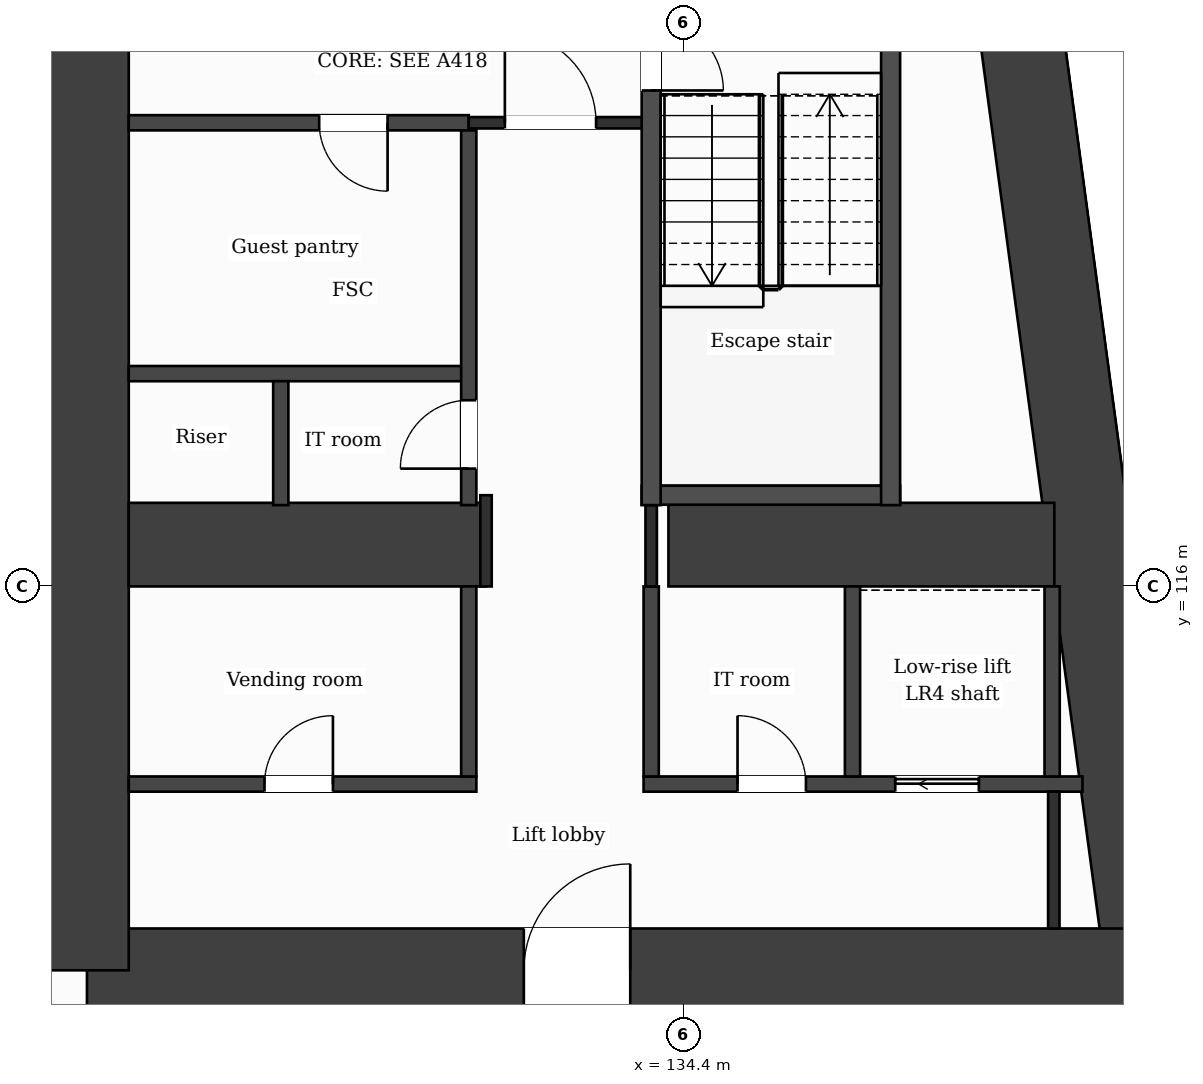
"""IFC4 building model, lengths in metres.
Left out: names, types, materials, properties, quantities, classifications, styles, units other than length and angle.
Written with IfcOpenShell. Run it as: python <this file> out.ifc"""

import sys

from ifc_helpers import new_model, si_unit, direction, frame, frame_2d, origin, place, context, subcontext, project, spatial, rectangle, extrude, element, fill, save


model = new_model("IFC4")
c1 = context("Model", 3, precision=1e-05, world=origin(), true_north=direction((0.0, 1.0)))
c2 = subcontext(c1, "Body", "Model", "MODEL_VIEW")
j1 = project(units=[si_unit("LENGTHUNIT", "METRE"), si_unit("PLANEANGLEUNIT", "RADIAN")], contexts=[c1])
p1 = place(None, origin())
s1 = spatial("IfcSite", under=j1, at=p1, CompositionType="ELEMENT")
p2 = place(p1, origin())
s2 = spatial("IfcBuilding", under=s1, at=p2, CompositionType="ELEMENT")
p3 = place(p2, frame((0.0, 0.0, 77.5)))
s3 = spatial("IfcBuildingStorey", under=s2, at=p3, CompositionType="ELEMENT", Elevation=77.5)
p4 = place(p3, frame((137.688, 131.85, 0.0), z_axis=(0.0, 0.0, 1.0), x_axis=(0.133411793472, -0.991060691059, 0.0)))
e1 = element("IfcWall", 1, at=p4, inside=s3, PredefinedType="SHEAR", context=c2, shape_type="SweptSolid", body=[
    extrude(rectangle(XDim=21.089, YDim=1.1, at=frame_2d((10.544, 0.0))), origin(), (0.0, 0.0, 1.0), 3.5),
])
p5 = place(p3, frame((140.502, 110.95, 0.0), z_axis=(0.0, 0.0, 1.0), x_axis=(-1.0, 0.0, 0.0)))
e2 = element("IfcWall", 2, at=p5, inside=s3, PredefinedType="SHEAR", context=c2, shape_type="SweptSolid", body=[
    extrude(rectangle(XDim=13.952, YDim=1.1, at=frame_2d((6.976, 0.0))), origin(), (0.0, 0.0, 1.0), 3.5),
])
p6 = place(p5, frame((6.804, 0.0, 0.0)))
e3 = element("IfcOpeningElement", 3, at=p6, cuts=e2, PredefinedType="OPENING", context=c2, shape_type="SweptSolid", body=[
    extrude(rectangle(XDim=1.4, YDim=2.1, at=frame_2d((0.7, 1.05))), frame((0.0, 0.56, 0.0), z_axis=(0.0, -1.0, 0.0), x_axis=(1.0, 0.0, 0.0)), (0.0, 0.0, 1.0), 1.12),
])
p7 = place(p3, frame((126.55, 110.95, 0.0), z_axis=(0.0, 0.0, 1.0), x_axis=(0.0, 1.0, 0.0)))
e4 = element("IfcWall", 4, at=p7, inside=s3, PredefinedType="SHEAR", context=c2, shape_type="SweptSolid", body=[
    extrude(rectangle(XDim=20.9, YDim=1.1, at=frame_2d((10.45, 0.0))), origin(), (0.0, 0.0, 1.0), 3.5),
])
p8 = place(p3, frame((127.1, 116.55, 0.0), z_axis=(0.0, 0.0, 1.0), x_axis=(1.0, 0.0, 0.0)))
e5 = element("IfcWall", 5, at=p8, inside=s3, PredefinedType="SHEAR", context=c2, shape_type="SweptSolid", body=[
    extrude(rectangle(XDim=4.7, YDim=1.1, at=frame_2d((2.35, 0.0))), origin(), (0.0, 0.0, 1.0), 3.5),
])
p9 = place(p3, frame((134.2, 116.55, 0.0), z_axis=(0.0, 0.0, 1.0), x_axis=(1.0, 0.0, 0.0)))
e6 = element("IfcWall", 6, at=p9, inside=s3, PredefinedType="SHEAR", context=c2, shape_type="SweptSolid", body=[
    extrude(rectangle(XDim=5.077, YDim=1.1, at=frame_2d((2.539, 0.0))), origin(), (0.0, 0.0, 1.0), 3.5),
])
p10 = place(p3, frame((127.1, 113.4, 0.0), z_axis=(0.0, 0.0, 1.0), x_axis=(1.0, 0.0, 0.0)))
e7 = element("IfcWall", 7, at=p10, inside=s3, PredefinedType="PARTITIONING", context=c2, shape_type="SweptSolid", body=[
    extrude(rectangle(XDim=4.573, YDim=0.2, at=frame_2d((2.287, 0.0))), origin(), (0.0, 0.0, 1.0), 3.0),
])
p11 = place(p10, frame((1.786, 0.0, 0.0)))
e8 = element("IfcOpeningElement", 8, at=p11, cuts=e7, PredefinedType="OPENING", context=c2, shape_type="SweptSolid", body=[
    extrude(rectangle(XDim=0.9, YDim=2.1, at=frame_2d((0.45, 1.05))), frame((0.0, 0.11, 0.0), z_axis=(0.0, -1.0, 0.0), x_axis=(1.0, 0.0, 0.0)), (0.0, 0.0, 1.0), 0.22),
])
p12 = place(p3, frame((133.873, 113.4, 0.0), z_axis=(0.0, 0.0, 1.0), x_axis=(1.0, 0.0, 0.0)))
e9 = element("IfcWall", 9, at=p12, inside=s3, PredefinedType="PARTITIONING", context=c2, shape_type="SweptSolid", body=[
    extrude(rectangle(XDim=5.774, YDim=0.2, at=frame_2d((2.887, 0.0))), origin(), (0.0, 0.0, 1.0), 3.0),
])
p13 = place(p12, frame((3.311, 0.0, 0.0)))
e10 = element("IfcOpeningElement", 10, at=p13, cuts=e9, PredefinedType="OPENING", context=c2, shape_type="SweptSolid", body=[
    extrude(rectangle(XDim=1.1, YDim=2.1, at=frame_2d((0.55, 1.05))), frame((0.0, 0.11, 0.0), z_axis=(0.0, -1.0, 0.0), x_axis=(1.0, 0.0, 0.0)), (0.0, 0.0, 1.0), 0.22),
])
p14 = place(p12, frame((1.236, 0.0, 0.0)))
e11 = element("IfcOpeningElement", 11, at=p14, cuts=e9, PredefinedType="OPENING", context=c2, shape_type="SweptSolid", body=[
    extrude(rectangle(XDim=0.9, YDim=2.1, at=frame_2d((0.45, 1.05))), frame((0.0, 0.11, 0.0), z_axis=(0.0, -1.0, 0.0), x_axis=(1.0, 0.0, 0.0)), (0.0, 0.0, 1.0), 0.22),
])
p15 = place(p3, frame((133.848, 117.2, 0.0), z_axis=(0.0, 0.0, 1.0), x_axis=(1.0, 0.0, 0.0)))
e12 = element("IfcWall", 12, at=p15, inside=s3, PredefinedType="PARTITIONING", context=c2, shape_type="SweptSolid", body=[
    extrude(rectangle(XDim=3.4, YDim=0.25, at=frame_2d((1.7, 0.0))), origin(), (0.0, 0.0, 1.0), 3.0),
])
p16 = place(p3, frame((127.1, 118.8, 0.0), z_axis=(0.0, 0.0, 1.0), x_axis=(1.0, 0.0, 0.0)))
e13 = element("IfcWall", 13, at=p16, inside=s3, PredefinedType="PARTITIONING", context=c2, shape_type="SweptSolid", body=[
    extrude(rectangle(XDim=4.473, YDim=0.2, at=frame_2d((2.236, 0.0))), origin(), (0.0, 0.0, 1.0), 3.0),
])
p17 = place(p3, frame((127.1, 122.1, 0.0), z_axis=(0.0, 0.0, 1.0), x_axis=(1.0, 0.0, 0.0)))
e14 = element("IfcWall", 14, at=p17, inside=s3, PredefinedType="PARTITIONING", context=c2, shape_type="SweptSolid", body=[
    extrude(rectangle(XDim=4.473, YDim=0.2, at=frame_2d((2.236, 0.0))), origin(), (0.0, 0.0, 1.0), 3.0),
])
p18 = place(p17, frame((2.505, 0.0, 0.0)))
e15 = element("IfcOpeningElement", 15, at=p18, cuts=e14, PredefinedType="OPENING", context=c2, shape_type="SweptSolid", body=[
    extrude(rectangle(XDim=0.9, YDim=2.1, at=frame_2d((0.45, 1.05))), frame((0.0, 0.11, 0.0), z_axis=(0.0, -1.0, 0.0), x_axis=(1.0, 0.0, 0.0)), (0.0, 0.0, 1.0), 0.22),
])
p19 = place(p3, frame((131.573, 122.1, 0.0), z_axis=(0.0, 0.0, 1.0), x_axis=(1.0, 0.0, 0.0)))
e16 = element("IfcWall", 16, at=p19, inside=s3, PredefinedType="PARTITIONING", context=c2, shape_type="SweptSolid", body=[
    extrude(rectangle(XDim=2.4, YDim=0.15, at=frame_2d((1.2, 0.0))), origin(), (0.0, 0.0, 1.0), 3.0),
])
p20 = place(p19, frame((0.475, 0.0, 0.0)))
e17 = element("IfcOpeningElement", 17, at=p20, cuts=e16, PredefinedType="OPENING", context=c2, shape_type="SweptSolid", body=[
    extrude(rectangle(XDim=1.2, YDim=2.1, at=frame_2d((0.6, 1.05))), frame((0.0, 0.085, 0.0), z_axis=(0.0, -1.0, 0.0), x_axis=(1.0, 0.0, 0.0)), (0.0, 0.0, 1.0), 0.17),
])
p21 = place(p3, frame((129.1, 117.07, 0.0), z_axis=(0.0, 0.0, 1.0), x_axis=(0.0, 1.0, 0.0)))
e18 = element("IfcWall", 18, at=p21, inside=s3, PredefinedType="PARTITIONING", context=c2, shape_type="SweptSolid", body=[
    extrude(rectangle(XDim=1.63, YDim=0.2, at=frame_2d((0.815, 0.0))), origin(), (0.0, 0.0, 1.0), 3.0),
])
p22 = place(p3, frame((131.573, 113.5, 0.0), z_axis=(0.0, 0.0, 1.0), x_axis=(0.0, 1.0, 0.0)))
e19 = element("IfcWall", 19, at=p22, inside=s3, PredefinedType="PARTITIONING", context=c2, shape_type="SweptSolid", body=[
    extrude(rectangle(XDim=2.5, YDim=0.2, at=frame_2d((1.25, 0.0))), origin(), (0.0, 0.0, 1.0), 3.0),
])
p23 = place(p3, frame((131.573, 117.07, 0.0), z_axis=(0.0, 0.0, 1.0), x_axis=(0.0, 1.0, 0.0)))
e20 = element("IfcWall", 20, at=p23, inside=s3, PredefinedType="PARTITIONING", context=c2, shape_type="SweptSolid", body=[
    extrude(rectangle(XDim=4.93, YDim=0.2, at=frame_2d((2.465, 0.0))), origin(), (0.0, 0.0, 1.0), 3.0),
])
p24 = place(p23, frame((0.48, 0.0, 0.0)))
e21 = element("IfcOpeningElement", 21, at=p24, cuts=e20, PredefinedType="OPENING", context=c2, shape_type="SweptSolid", body=[
    extrude(rectangle(XDim=0.9, YDim=2.1, at=frame_2d((0.45, 1.05))), frame((0.0, 0.11, 0.0), z_axis=(0.0, -1.0, 0.0), x_axis=(1.0, 0.0, 0.0)), (0.0, 0.0, 1.0), 0.22),
])
p25 = place(p3, frame((131.8, 116.0, 0.0), z_axis=(0.0, 0.0, 1.0), x_axis=(0.0, 1.0, 0.0)))
e22 = element("IfcWall", 22, at=p25, inside=s3, PredefinedType="PARTITIONING", context=c2, shape_type="SweptSolid", body=[
    extrude(rectangle(XDim=1.2, YDim=0.15, at=frame_2d((0.6, 0.0))), origin(), (0.0, 0.0, 1.0), 3.0),
])
p26 = place(p3, frame((133.973, 113.5, 0.0), z_axis=(0.0, 0.0, 1.0), x_axis=(0.0, 1.0, 0.0)))
e23 = element("IfcWall", 23, at=p26, inside=s3, PredefinedType="PARTITIONING", context=c2, shape_type="SweptSolid", body=[
    extrude(rectangle(XDim=2.5, YDim=0.2, at=frame_2d((1.25, 0.0))), origin(), (0.0, 0.0, 1.0), 3.0),
])
p27 = place(p3, frame((133.973, 116.0, 0.0), z_axis=(0.0, 0.0, 1.0), x_axis=(0.0, 1.0, 0.0)))
e24 = element("IfcWall", 24, at=p27, inside=s3, PredefinedType="PARTITIONING", context=c2, shape_type="SweptSolid", body=[
    extrude(rectangle(XDim=1.07, YDim=0.15, at=frame_2d((0.535, 0.0))), origin(), (0.0, 0.0, 1.0), 3.0),
])
p28 = place(p3, frame((133.973, 117.07, 0.0), z_axis=(0.0, 0.0, 1.0), x_axis=(0.0, 1.0, 0.0)))
e25 = element("IfcWall", 25, at=p28, inside=s3, PredefinedType="PARTITIONING", context=c2, shape_type="SweptSolid", body=[
    extrude(rectangle(XDim=6.755, YDim=0.25, at=frame_2d((3.377, 0.0))), origin(), (0.0, 0.0, 1.0), 3.0),
])
p29 = place(p28, frame((5.455, 0.0, 0.0)))
e26 = element("IfcOpeningElement", 26, at=p29, cuts=e25, PredefinedType="OPENING", context=c2, shape_type="SweptSolid", body=[
    extrude(rectangle(XDim=0.95, YDim=2.1, at=frame_2d((0.475, 1.05))), frame((0.0, 0.135, 0.0), z_axis=(0.0, -1.0, 0.0), x_axis=(1.0, 0.0, 0.0)), (0.0, 0.0, 1.0), 0.27),
])
p30 = place(p3, frame((136.622, 113.5, 0.0), z_axis=(0.0, 0.0, 1.0), x_axis=(0.0, 1.0, 0.0)))
e27 = element("IfcWall", 27, at=p30, inside=s3, PredefinedType="PARTITIONING", context=c2, shape_type="SweptSolid", body=[
    extrude(rectangle(XDim=2.5, YDim=0.2, at=frame_2d((1.25, 0.0))), origin(), (0.0, 0.0, 1.0), 3.0),
])
p31 = place(p3, frame((137.123, 117.07, 0.0), z_axis=(0.0, 0.0, 1.0), x_axis=(0.0, 1.0, 0.0)))
e28 = element("IfcWall", 28, at=p31, inside=s3, PredefinedType="PARTITIONING", context=c2, shape_type="SweptSolid", body=[
    extrude(rectangle(XDim=6.755, YDim=0.25, at=frame_2d((3.377, 0.0))), origin(), (0.0, 0.0, 1.0), 3.0),
])
p32 = place(p3, frame((139.248, 113.5, 0.0), z_axis=(0.0, 0.0, 1.0), x_axis=(0.0, 1.0, 0.0)))
e29 = element("IfcWall", 29, at=p32, inside=s3, PredefinedType="PARTITIONING", context=c2, shape_type="SweptSolid", body=[
    extrude(rectangle(XDim=2.5, YDim=0.2, at=frame_2d((1.25, 0.0))), origin(), (0.0, 0.0, 1.0), 3.0),
])
p33 = place(p3, frame((139.27, 111.5, 0.0), z_axis=(0.0, 0.0, 1.0), x_axis=(0.0, 1.0, 0.0)))
e30 = element("IfcWall", 30, at=p33, inside=s3, PredefinedType="PARTITIONING", context=c2, shape_type="SweptSolid", body=[
    extrude(rectangle(XDim=1.8, YDim=0.15, at=frame_2d((0.9, 0.0))), origin(), (0.0, 0.0, 1.0), 3.0),
])
p34 = place(p20, origin())
e31 = element("IfcDoor", 31, at=p34, inside=s3, OperationType="SINGLE_SWING_LEFT", PredefinedType="DOOR", context=c2, shape_type="SweptSolid", body=[
    extrude(rectangle(XDim=1.2, YDim=2.1, at=frame_2d((0.6, 1.05))), frame((0.0, 0.025, 0.0), z_axis=(0.0, -1.0, 0.0), x_axis=(1.0, 0.0, 0.0)), (0.0, 0.0, 1.0), 0.05),
])
fill(e17, e31)
p35 = place(p18, origin())
e32 = element("IfcDoor", 32, at=p35, inside=s3, OperationType="SINGLE_SWING_RIGHT", PredefinedType="DOOR", context=c2, shape_type="SweptSolid", body=[
    extrude(rectangle(XDim=0.9, YDim=2.1, at=frame_2d((0.45, 1.05))), frame((0.0, 0.025, 0.0), z_axis=(0.0, -1.0, 0.0), x_axis=(1.0, 0.0, 0.0)), (0.0, 0.0, 1.0), 0.05),
])
fill(e15, e32)
p36 = place(p29, origin())
e33 = element("IfcDoor", 33, at=p36, inside=s3, OperationType="SINGLE_SWING_LEFT", PredefinedType="DOOR", context=c2, shape_type="SweptSolid", body=[
    extrude(rectangle(XDim=0.95, YDim=2.1, at=frame_2d((0.475, 1.05))), frame((0.0, 0.025, 0.0), z_axis=(0.0, -1.0, 0.0), x_axis=(1.0, 0.0, 0.0)), (0.0, 0.0, 1.0), 0.05),
])
fill(e26, e33)
p37 = place(p24, origin())
e34 = element("IfcDoor", 34, at=p37, inside=s3, OperationType="SINGLE_SWING_LEFT", PredefinedType="DOOR", context=c2, shape_type="SweptSolid", body=[
    extrude(rectangle(XDim=0.9, YDim=2.1, at=frame_2d((0.45, 1.05))), frame((0.0, 0.025, 0.0), z_axis=(0.0, -1.0, 0.0), x_axis=(1.0, 0.0, 0.0)), (0.0, 0.0, 1.0), 0.05),
])
fill(e21, e34)
p38 = place(p13, origin())
e35 = element("IfcDoor", 35, at=p38, inside=s3, OperationType="SLIDING_TO_LEFT", PredefinedType="DOOR", context=c2, shape_type="SweptSolid", body=[
    extrude(rectangle(XDim=1.1, YDim=2.1, at=frame_2d((0.55, 1.05))), frame((0.0, 0.025, 0.0), z_axis=(0.0, -1.0, 0.0), x_axis=(1.0, 0.0, 0.0)), (0.0, 0.0, 1.0), 0.05),
])
fill(e10, e35)
p39 = place(p14, origin())
e36 = element("IfcDoor", 36, at=p39, inside=s3, OperationType="SINGLE_SWING_LEFT", PredefinedType="DOOR", context=c2, shape_type="SweptSolid", body=[
    extrude(rectangle(XDim=0.9, YDim=2.1, at=frame_2d((0.45, 1.05))), frame((0.0, 0.025, 0.0), z_axis=(0.0, -1.0, 0.0), x_axis=(1.0, 0.0, 0.0)), (0.0, 0.0, 1.0), 0.05),
])
fill(e11, e36)
p40 = place(p11, origin())
e37 = element("IfcDoor", 37, at=p40, inside=s3, OperationType="SINGLE_SWING_RIGHT", PredefinedType="DOOR", context=c2, shape_type="SweptSolid", body=[
    extrude(rectangle(XDim=0.9, YDim=2.1, at=frame_2d((0.45, 1.05))), frame((0.0, 0.025, 0.0), z_axis=(0.0, -1.0, 0.0), x_axis=(1.0, 0.0, 0.0)), (0.0, 0.0, 1.0), 0.05),
])
fill(e8, e37)
p41 = place(p6, origin())
e38 = element("IfcDoor", 38, at=p41, inside=s3, OperationType="SINGLE_SWING_LEFT", PredefinedType="DOOR", context=c2, shape_type="SweptSolid", body=[
    extrude(rectangle(XDim=1.4, YDim=2.1, at=frame_2d((0.7, 1.05))), frame((0.0, 0.025, 0.0), z_axis=(0.0, -1.0, 0.0), x_axis=(1.0, 0.0, 0.0)), (0.0, 0.0, 1.0), 0.05),
])
fill(e3, e38)
save(model, sys.argv[1])
